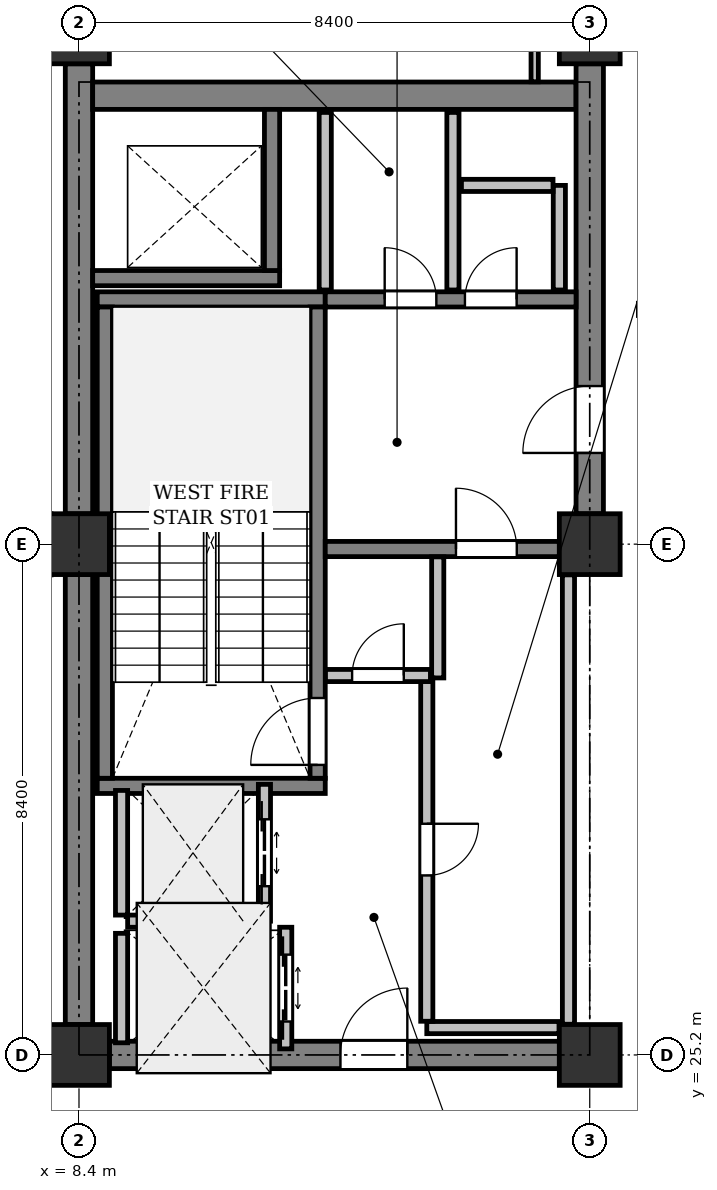
"""IFC4 building model, lengths in metres.
Left out: names, types, materials, properties, quantities, classifications, styles, units other than length and angle.
Written with IfcOpenShell. Run it as: python <this file> out.ifc"""

import sys

from ifc_helpers import new_model, si_unit, direction, frame, frame_2d, origin, origin_2d, place, context, subcontext, project, spatial, rectangle, extrude, element, fill, save


model = new_model("IFC4")
c1 = context("Model", 3, precision=1e-05, world=origin(), true_north=direction((0.0, 1.0)))
c2 = subcontext(c1, "Body", "Model", "MODEL_VIEW")
j1 = project(units=[si_unit("LENGTHUNIT", "METRE"), si_unit("PLANEANGLEUNIT", "RADIAN")], contexts=[c1])
p1 = place(None, origin())
s1 = spatial("IfcSite", under=j1, at=p1, CompositionType="ELEMENT")
p2 = place(p1, origin())
s2 = spatial("IfcBuilding", under=s1, at=p2, CompositionType="ELEMENT")
p3 = place(p2, frame((0.0, 0.0, 224.7)))
s3 = spatial("IfcBuildingStorey", under=s2, at=p3, CompositionType="ELEMENT", Elevation=224.7)
for number, where, z_axis, x_axis in (
    (1, (8.4, 25.2, 0.0), (0.0, 0.0, 1.0), (1.0, 0.0, 0.0)),
    (2, (8.4, 33.6, 0.0), (0.0, 0.0, 1.0), (1.0, 0.0, 0.0)),
    (3, (8.4, 42.0, 0.0), (0.0, 0.0, 1.0), (1.0, 0.0, 0.0)),
    (4, (16.8, 25.2, 0.0), (0.0, 0.0, 1.0), (1.0, 0.0, 0.0)),
    (5, (16.8, 33.6, 0.0), (0.0, 0.0, 1.0), (1.0, 0.0, 0.0)),
    (6, (16.8, 42.0, 0.0), (0.0, 0.0, 1.0), (1.0, 0.0, 0.0)),
):
    element("IfcColumn", number, at=place(p3, frame(where, z_axis=z_axis, x_axis=x_axis)), inside=s3, PredefinedType="COLUMN", context=c2, shape_type="SweptSolid", body=[
        extrude(rectangle(XDim=1.0, YDim=1.0, at=origin_2d()), origin(), (0.0, 0.0, 1.0), 4.1),
    ])
p4 = place(p3, frame((8.4, 25.7, 0.0), z_axis=(0.0, 0.0, 1.0), x_axis=(0.0, 1.0, 0.0)))
e7 = element("IfcWall", 7, at=p4, inside=s3, PredefinedType="SHEAR", context=c2, shape_type="SweptSolid", body=[
    extrude(rectangle(XDim=7.4, YDim=0.45, at=frame_2d((3.7, 0.0))), origin(), (0.0, 0.0, 1.0), 3.825),
])
p5 = place(p3, frame((8.4, 34.1, 0.0), z_axis=(0.0, 0.0, 1.0), x_axis=(0.0, 1.0, 0.0)))
e8 = element("IfcWall", 8, at=p5, inside=s3, PredefinedType="SHEAR", context=c2, shape_type="SweptSolid", body=[
    extrude(rectangle(XDim=7.4, YDim=0.45, at=frame_2d((3.7, 0.0))), origin(), (0.0, 0.0, 1.0), 3.825),
])
p6 = place(p3, frame((8.625, 40.975, 0.0), z_axis=(0.0, 0.0, 1.0), x_axis=(1.0, 0.0, 0.0)))
e9 = element("IfcWall", 9, at=p6, inside=s3, PredefinedType="SHEAR", context=c2, shape_type="SweptSolid", body=[
    extrude(rectangle(XDim=7.95, YDim=0.45, at=frame_2d((3.975, 0.0))), origin(), (0.0, 0.0, 1.0), 3.825),
])
p7 = place(p3, frame((16.8, 34.1, 0.0), z_axis=(0.0, 0.0, 1.0), x_axis=(0.0, 1.0, 0.0)))
e10 = element("IfcWall", 10, at=p7, inside=s3, PredefinedType="SHEAR", context=c2, shape_type="SweptSolid", body=[
    extrude(rectangle(XDim=7.4, YDim=0.45, at=frame_2d((3.7, 0.0))), origin(), (0.0, 0.0, 1.0), 3.825),
])
p8 = place(p7, frame((1.0, 0.0, 0.0)))
e11 = element("IfcOpeningElement", 11, at=p8, cuts=e10, PredefinedType="OPENING", context=c2, shape_type="SweptSolid", body=[
    extrude(rectangle(XDim=1.1, YDim=2.15, at=frame_2d((0.55, 1.075))), frame((0.0, 0.235, 0.0), z_axis=(0.0, -1.0, 0.0), x_axis=(1.0, 0.0, 0.0)), (0.0, 0.0, 1.0), 0.47),
])
p9 = place(p3, frame((8.9, 25.2, 0.0), z_axis=(0.0, 0.0, 1.0), x_axis=(1.0, 0.0, 0.0)))
e12 = element("IfcWall", 12, at=p9, inside=s3, PredefinedType="SHEAR", context=c2, shape_type="SweptSolid", body=[
    extrude(rectangle(XDim=7.4, YDim=0.45, at=frame_2d((3.7, 0.0))), origin(), (0.0, 0.0, 1.0), 3.825),
])
p10 = place(p9, frame((3.8, 0.0, 0.0)))
e13 = element("IfcOpeningElement", 13, at=p10, cuts=e12, PredefinedType="OPENING", context=c2, shape_type="SweptSolid", body=[
    extrude(rectangle(XDim=1.1, YDim=2.15, at=frame_2d((0.55, 1.075))), frame((0.0, 0.235, 0.0), z_axis=(0.0, -1.0, 0.0), x_axis=(1.0, 0.0, 0.0)), (0.0, 0.0, 1.0), 0.47),
])
for number, where, z_axis, x_axis in (
    (14, (12.45, 29.625, 0.0), (0.0, 0.0, 1.0), (-1.0, 0.0, 0.0)),
    (15, (12.45, 37.625, 0.0), (0.0, 0.0, 1.0), (-1.0, 0.0, 0.0)),
):
    element("IfcWall", number, at=place(p3, frame(where, z_axis=z_axis, x_axis=x_axis)), inside=s3, PredefinedType="SHEAR", context=c2, shape_type="SweptSolid", body=[
        extrude(rectangle(XDim=3.75, YDim=0.25, at=frame_2d((1.875, 0.0))), origin(), (0.0, 0.0, 1.0), 3.825),
    ])
p11 = place(p3, frame((12.325, 29.75, 0.0), z_axis=(0.0, 0.0, 1.0), x_axis=(0.0, 1.0, 0.0)))
e16 = element("IfcWall", 16, at=p11, inside=s3, PredefinedType="SHEAR", context=c2, shape_type="SweptSolid", body=[
    extrude(rectangle(XDim=7.75, YDim=0.25, at=frame_2d((3.875, 0.0))), origin(), (0.0, 0.0, 1.0), 3.825),
])
p12 = place(p11, frame((0.22, 0.0, 0.0)))
e17 = element("IfcOpeningElement", 17, at=p12, cuts=e16, PredefinedType="OPENING", context=c2, shape_type="SweptSolid", body=[
    extrude(rectangle(XDim=1.1, YDim=2.15, at=frame_2d((0.55, 1.075))), frame((0.0, 0.135, 0.0), z_axis=(0.0, -1.0, 0.0), x_axis=(1.0, 0.0, 0.0)), (0.0, 0.0, 1.0), 0.27),
])
p13 = place(p3, frame((8.825, 29.75, 0.0), z_axis=(0.0, 0.0, 1.0), x_axis=(0.0, 1.0, 0.0)))
e18 = element("IfcWall", 18, at=p13, inside=s3, PredefinedType="SHEAR", context=c2, shape_type="SweptSolid", body=[
    extrude(rectangle(XDim=7.75, YDim=0.25, at=frame_2d((3.875, 0.0))), origin(), (0.0, 0.0, 1.0), 3.825),
])
p14 = place(p3, frame((8.625, 37.975, 0.0), z_axis=(0.0, 0.0, 1.0), x_axis=(1.0, 0.0, 0.0)))
e19 = element("IfcWall", 19, at=p14, inside=s3, PredefinedType="SHEAR", context=c2, shape_type="SweptSolid", body=[
    extrude(rectangle(XDim=3.075, YDim=0.25, at=frame_2d((1.538, 0.0))), origin(), (0.0, 0.0, 1.0), 3.825),
])
p15 = place(p3, frame((11.575, 38.1, 0.0), z_axis=(0.0, 0.0, 1.0), x_axis=(0.0, 1.0, 0.0)))
e20 = element("IfcWall", 20, at=p15, inside=s3, PredefinedType="SHEAR", context=c2, shape_type="SweptSolid", body=[
    extrude(rectangle(XDim=2.65, YDim=0.25, at=frame_2d((1.325, 0.0))), origin(), (0.0, 0.0, 1.0), 3.825),
])
p16 = place(p3, frame((12.45, 33.52, 0.0), z_axis=(0.0, 0.0, 1.0), x_axis=(1.0, 0.0, 0.0)))
e21 = element("IfcWall", 21, at=p16, inside=s3, PredefinedType="SHEAR", context=c2, shape_type="SweptSolid", body=[
    extrude(rectangle(XDim=3.85, YDim=0.25, at=frame_2d((1.925, 0.0))), origin(), (0.0, 0.0, 1.0), 3.825),
])
p17 = place(p16, frame((2.15, 0.0, 0.0)))
e22 = element("IfcOpeningElement", 22, at=p17, cuts=e21, PredefinedType="OPENING", context=c2, shape_type="SweptSolid", body=[
    extrude(rectangle(XDim=1.0, YDim=2.15, at=frame_2d((0.5, 1.075))), frame((0.0, 0.135, 0.0), z_axis=(0.0, -1.0, 0.0), x_axis=(1.0, 0.0, 0.0)), (0.0, 0.0, 1.0), 0.27),
])
p18 = place(p3, frame((12.45, 37.625, 0.0), z_axis=(0.0, 0.0, 1.0), x_axis=(1.0, 0.0, 0.0)))
e23 = element("IfcWall", 23, at=p18, inside=s3, PredefinedType="SHEAR", context=c2, shape_type="SweptSolid", body=[
    extrude(rectangle(XDim=4.125, YDim=0.25, at=frame_2d((2.062, 0.0))), origin(), (0.0, 0.0, 1.0), 3.825),
])
p19 = place(p18, frame((0.978, 0.0, 0.0)))
e24 = element("IfcOpeningElement", 24, at=p19, cuts=e23, PredefinedType="OPENING", context=c2, shape_type="SweptSolid", body=[
    extrude(rectangle(XDim=0.85, YDim=2.15, at=frame_2d((0.425, 1.075))), frame((0.0, 0.135, 0.0), z_axis=(0.0, -1.0, 0.0), x_axis=(1.0, 0.0, 0.0)), (0.0, 0.0, 1.0), 0.27),
])
p20 = place(p18, frame((2.298, 0.0, 0.0)))
e25 = element("IfcOpeningElement", 25, at=p20, cuts=e23, PredefinedType="OPENING", context=c2, shape_type="SweptSolid", body=[
    extrude(rectangle(XDim=0.85, YDim=2.15, at=frame_2d((0.425, 1.075))), frame((0.0, 0.135, 0.0), z_axis=(0.0, -1.0, 0.0), x_axis=(1.0, 0.0, 0.0)), (0.0, 0.0, 1.0), 0.27),
])
p21 = place(p3, frame((11.45, 27.4, 0.0), z_axis=(0.0, 0.0, 1.0), x_axis=(0.0, 1.0, 0.0)))
e26 = element("IfcWall", 26, at=p21, inside=s3, PredefinedType="PARTITIONING", context=c2, shape_type="SweptSolid", body=[
    extrude(rectangle(XDim=2.25, YDim=0.2, at=frame_2d((1.125, 0.0))), origin(), (0.0, 0.0, 1.0), 3.825),
])
p22 = place(p21, frame((0.575, 0.0, 0.0)))
e27 = element("IfcOpeningElement", 27, at=p22, cuts=e26, PredefinedType="OPENING", context=c2, shape_type="SweptSolid", body=[
    extrude(rectangle(XDim=1.1, YDim=2.2, at=frame_2d((0.55, 1.1))), frame((0.0, 0.11, 0.0), z_axis=(0.0, -1.0, 0.0), x_axis=(1.0, 0.0, 0.0)), (0.0, 0.0, 1.0), 0.22),
])
p23 = place(p3, frame((9.1, 27.5, 0.0), z_axis=(0.0, 0.0, 1.0), x_axis=(0.0, 1.0, 0.0)))
e28 = element("IfcWall", 28, at=p23, inside=s3, PredefinedType="PARTITIONING", context=c2, shape_type="SweptSolid", body=[
    extrude(rectangle(XDim=2.05, YDim=0.2, at=frame_2d((1.025, 0.0))), origin(), (0.0, 0.0, 1.0), 3.825),
])
p24 = place(p3, frame((9.2, 27.4, 0.0), z_axis=(0.0, 0.0, 1.0), x_axis=(1.0, 0.0, 0.0)))
e29 = element("IfcWall", 29, at=p24, inside=s3, PredefinedType="PARTITIONING", context=c2, shape_type="SweptSolid", body=[
    extrude(rectangle(XDim=2.15, YDim=0.2, at=frame_2d((1.075, 0.0))), origin(), (0.0, 0.0, 1.0), 3.825),
])
p25 = place(p3, frame((11.8, 25.3, 0.0), z_axis=(0.0, 0.0, 1.0), x_axis=(0.0, 1.0, 0.0)))
e30 = element("IfcWall", 30, at=p25, inside=s3, PredefinedType="PARTITIONING", context=c2, shape_type="SweptSolid", body=[
    extrude(rectangle(XDim=2.0, YDim=0.2, at=frame_2d((1.0, 0.0))), origin(), (0.0, 0.0, 1.0), 3.825),
])
p26 = place(p25, frame((0.45, 0.0, 0.0)))
e31 = element("IfcOpeningElement", 31, at=p26, cuts=e30, PredefinedType="OPENING", context=c2, shape_type="SweptSolid", body=[
    extrude(rectangle(XDim=1.1, YDim=2.2, at=frame_2d((0.55, 1.1))), frame((0.0, 0.11, 0.0), z_axis=(0.0, -1.0, 0.0), x_axis=(1.0, 0.0, 0.0)), (0.0, 0.0, 1.0), 0.22),
])
p27 = place(p3, frame((9.1, 25.4, 0.0), z_axis=(0.0, 0.0, 1.0), x_axis=(0.0, 1.0, 0.0)))
e32 = element("IfcWall", 32, at=p27, inside=s3, PredefinedType="PARTITIONING", context=c2, shape_type="SweptSolid", body=[
    extrude(rectangle(XDim=1.8, YDim=0.2, at=frame_2d((0.9, 0.0))), origin(), (0.0, 0.0, 1.0), 3.825),
])
p28 = place(p3, frame((14.12, 25.65, 0.0), z_axis=(0.0, 0.0, 1.0), x_axis=(1.0, 0.0, 0.0)))
e33 = element("IfcWall", 33, at=p28, inside=s3, PredefinedType="PARTITIONING", context=c2, shape_type="SweptSolid", body=[
    extrude(rectangle(XDim=2.175, YDim=0.2, at=frame_2d((1.087, 0.0))), origin(), (0.0, 0.0, 1.0), 3.825),
])
p29 = place(p3, frame((16.45, 25.705, 0.0), z_axis=(0.0, 0.0, 1.0), x_axis=(0.0, 1.0, 0.0)))
e34 = element("IfcWall", 34, at=p29, inside=s3, PredefinedType="PARTITIONING", context=c2, shape_type="SweptSolid", body=[
    extrude(rectangle(XDim=7.39, YDim=0.2, at=frame_2d((3.695, 0.0))), origin(), (0.0, 0.0, 1.0), 3.825),
])
p30 = place(p3, frame((14.3, 33.391, 0.0), z_axis=(0.0, 0.0, 1.0), x_axis=(0.0, -1.0, 0.0)))
e35 = element("IfcWall", 35, at=p30, inside=s3, PredefinedType="PARTITIONING", context=c2, shape_type="SweptSolid", body=[
    extrude(rectangle(XDim=1.991, YDim=0.2, at=frame_2d((0.996, 0.0))), origin(), (0.0, 0.0, 1.0), 3.825),
])
p31 = place(p3, frame((14.12, 31.4, 0.0), z_axis=(0.0, 0.0, 1.0), x_axis=(0.0, -1.0, 0.0)))
e36 = element("IfcWall", 36, at=p31, inside=s3, PredefinedType="PARTITIONING", context=c2, shape_type="SweptSolid", body=[
    extrude(rectangle(XDim=5.646, YDim=0.2, at=frame_2d((2.823, 0.0))), origin(), (0.0, 0.0, 1.0), 3.825),
])
p32 = place(p31, frame((2.398, 0.0, 0.0)))
e37 = element("IfcOpeningElement", 37, at=p32, cuts=e36, PredefinedType="OPENING", context=c2, shape_type="SweptSolid", body=[
    extrude(rectangle(XDim=0.85, YDim=2.15, at=frame_2d((0.425, 1.075))), frame((0.0, 0.11, 0.0), z_axis=(0.0, -1.0, 0.0), x_axis=(1.0, 0.0, 0.0)), (0.0, 0.0, 1.0), 0.22),
])
p33 = place(p3, frame((12.454, 31.44, 0.0), z_axis=(0.0, 0.0, 1.0), x_axis=(1.0, 0.0, 0.0)))
e38 = element("IfcWall", 38, at=p33, inside=s3, PredefinedType="PARTITIONING", context=c2, shape_type="SweptSolid", body=[
    extrude(rectangle(XDim=1.726, YDim=0.2, at=frame_2d((0.863, 0.0))), origin(), (0.0, 0.0, 1.0), 3.825),
])
p34 = place(p33, frame((0.438, 0.0, 0.0)))
e39 = element("IfcOpeningElement", 39, at=p34, cuts=e38, PredefinedType="OPENING", context=c2, shape_type="SweptSolid", body=[
    extrude(rectangle(XDim=0.85, YDim=2.15, at=frame_2d((0.425, 1.075))), frame((0.0, 0.11, 0.0), z_axis=(0.0, -1.0, 0.0), x_axis=(1.0, 0.0, 0.0)), (0.0, 0.0, 1.0), 0.22),
])
for number, where, z_axis, x_axis in (
    (40, (14.55, 37.78, 0.0), (0.0, 0.0, 1.0), (0.0, 1.0, 0.0)),
    (41, (12.45, 40.7, 0.0), (0.0, 0.0, 1.0), (0.0, -1.0, 0.0)),
):
    element("IfcWall", number, at=place(p3, frame(where, z_axis=z_axis, x_axis=x_axis)), inside=s3, PredefinedType="PARTITIONING", context=c2, shape_type="SweptSolid", body=[
        extrude(rectangle(XDim=2.92, YDim=0.2, at=frame_2d((1.46, 0.0))), origin(), (0.0, 0.0, 1.0), 2.875),
    ])
p35 = place(p3, frame((16.3, 37.78, 0.0), z_axis=(0.0, 0.0, 1.0), x_axis=(0.0, 1.0, 0.0)))
e42 = element("IfcWall", 42, at=p35, inside=s3, PredefinedType="PARTITIONING", context=c2, shape_type="SweptSolid", body=[
    extrude(rectangle(XDim=1.72, YDim=0.2, at=frame_2d((0.86, 0.0))), origin(), (0.0, 0.0, 1.0), 2.875),
])
p36 = place(p3, frame((16.196, 39.5, 0.0), z_axis=(0.0, 0.0, 1.0), x_axis=(-1.0, 0.0, 0.0)))
e43 = element("IfcWall", 43, at=p36, inside=s3, PredefinedType="PARTITIONING", context=c2, shape_type="SweptSolid", body=[
    extrude(rectangle(XDim=1.506, YDim=0.2, at=frame_2d((0.753, 0.0))), origin(), (0.0, 0.0, 1.0), 2.875),
])
p37 = place(p3, frame((15.895, 41.204, 0.0), z_axis=(0.0, 0.0, 1.0), x_axis=(0.0, 1.0, 0.0)))
e44 = element("IfcWall", 44, at=p37, inside=s3, PredefinedType="PARTITIONING", context=c2, shape_type="SweptSolid", body=[
    extrude(rectangle(XDim=0.627, YDim=0.12, at=frame_2d((0.313, 0.0))), origin(), (0.0, 0.0, 1.0), 3.825),
])
p38 = place(p8, origin())
e45 = element("IfcDoor", 45, at=p38, inside=s3, OperationType="SINGLE_SWING_LEFT", PredefinedType="DOOR", context=c2, shape_type="SweptSolid", body=[
    extrude(rectangle(XDim=1.1, YDim=2.15, at=frame_2d((0.55, 1.075))), frame((0.0, 0.025, 0.0), z_axis=(0.0, -1.0, 0.0), x_axis=(1.0, 0.0, 0.0)), (0.0, 0.0, 1.0), 0.05),
])
fill(e11, e45)
p39 = place(p10, origin())
e46 = element("IfcDoor", 46, at=p39, inside=s3, OperationType="SINGLE_SWING_RIGHT", PredefinedType="DOOR", context=c2, shape_type="SweptSolid", body=[
    extrude(rectangle(XDim=1.1, YDim=2.15, at=frame_2d((0.55, 1.075))), frame((0.0, 0.025, 0.0), z_axis=(0.0, -1.0, 0.0), x_axis=(1.0, 0.0, 0.0)), (0.0, 0.0, 1.0), 0.05),
])
fill(e13, e46)
p40 = place(p12, origin())
e47 = element("IfcDoor", 47, at=p40, inside=s3, OperationType="SINGLE_SWING_LEFT", PredefinedType="DOOR", context=c2, shape_type="SweptSolid", body=[
    extrude(rectangle(XDim=1.1, YDim=2.15, at=frame_2d((0.55, 1.075))), frame((0.0, 0.025, 0.0), z_axis=(0.0, -1.0, 0.0), x_axis=(1.0, 0.0, 0.0)), (0.0, 0.0, 1.0), 0.05),
])
fill(e17, e47)
p41 = place(p17, origin())
e48 = element("IfcDoor", 48, at=p41, inside=s3, OperationType="SINGLE_SWING_LEFT", PredefinedType="DOOR", context=c2, shape_type="SweptSolid", body=[
    extrude(rectangle(XDim=1.0, YDim=2.15, at=frame_2d((0.5, 1.075))), frame((0.0, 0.025, 0.0), z_axis=(0.0, -1.0, 0.0), x_axis=(1.0, 0.0, 0.0)), (0.0, 0.0, 1.0), 0.05),
])
fill(e22, e48)
p42 = place(p22, origin())
e49 = element("IfcDoor", 49, at=p42, inside=s3, OperationType="DOUBLE_DOOR_SLIDING", PredefinedType="DOOR", context=c2, shape_type="SweptSolid", body=[
    extrude(rectangle(XDim=1.1, YDim=2.2, at=frame_2d((0.55, 1.1))), frame((0.0, 0.025, 0.0), z_axis=(0.0, -1.0, 0.0), x_axis=(1.0, 0.0, 0.0)), (0.0, 0.0, 1.0), 0.05),
])
fill(e27, e49)
p43 = place(p26, origin())
e50 = element("IfcDoor", 50, at=p43, inside=s3, OperationType="DOUBLE_DOOR_SLIDING", PredefinedType="DOOR", context=c2, shape_type="SweptSolid", body=[
    extrude(rectangle(XDim=1.1, YDim=2.2, at=frame_2d((0.55, 1.1))), frame((0.0, 0.025, 0.0), z_axis=(0.0, -1.0, 0.0), x_axis=(1.0, 0.0, 0.0)), (0.0, 0.0, 1.0), 0.05),
])
fill(e31, e50)
p44 = place(p32, origin())
e51 = element("IfcDoor", 51, at=p44, inside=s3, OperationType="SINGLE_SWING_LEFT", PredefinedType="DOOR", context=c2, shape_type="SweptSolid", body=[
    extrude(rectangle(XDim=0.85, YDim=2.15, at=frame_2d((0.425, 1.075))), frame((0.0, 0.025, 0.0), z_axis=(0.0, -1.0, 0.0), x_axis=(1.0, 0.0, 0.0)), (0.0, 0.0, 1.0), 0.05),
])
fill(e37, e51)
p45 = place(p34, origin())
e52 = element("IfcDoor", 52, at=p45, inside=s3, OperationType="SINGLE_SWING_RIGHT", PredefinedType="DOOR", context=c2, shape_type="SweptSolid", body=[
    extrude(rectangle(XDim=0.85, YDim=2.15, at=frame_2d((0.425, 1.075))), frame((0.0, 0.025, 0.0), z_axis=(0.0, -1.0, 0.0), x_axis=(1.0, 0.0, 0.0)), (0.0, 0.0, 1.0), 0.05),
])
fill(e39, e52)
p46 = place(p19, origin())
e53 = element("IfcDoor", 53, at=p46, inside=s3, OperationType="SINGLE_SWING_LEFT", PredefinedType="DOOR", context=c2, shape_type="SweptSolid", body=[
    extrude(rectangle(XDim=0.85, YDim=2.15, at=frame_2d((0.425, 1.075))), frame((0.0, 0.025, 0.0), z_axis=(0.0, -1.0, 0.0), x_axis=(1.0, 0.0, 0.0)), (0.0, 0.0, 1.0), 0.05),
])
fill(e24, e53)
p47 = place(p20, origin())
e54 = element("IfcDoor", 54, at=p47, inside=s3, OperationType="SINGLE_SWING_RIGHT", PredefinedType="DOOR", context=c2, shape_type="SweptSolid", body=[
    extrude(rectangle(XDim=0.85, YDim=2.15, at=frame_2d((0.425, 1.075))), frame((0.0, 0.025, 0.0), z_axis=(0.0, -1.0, 0.0), x_axis=(1.0, 0.0, 0.0)), (0.0, 0.0, 1.0), 0.05),
])
fill(e25, e54)
save(model, sys.argv[1])
